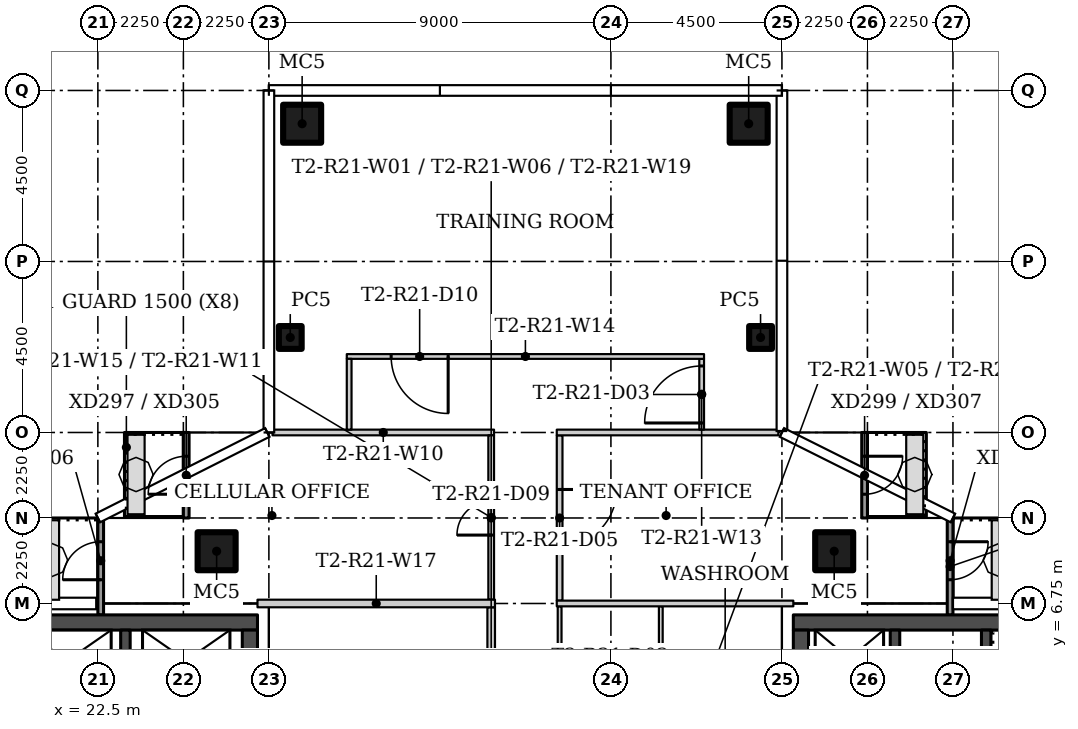
"""IFC4 building model, lengths in metres.
Left out: names, types, materials, properties, quantities, classifications, styles, units other than length and angle.
Written with IfcOpenShell. Run it as: python <this file> out.ifc"""

import sys

from ifc_helpers import new_model, si_unit, direction, frame, frame_2d, origin, origin_2d, place, context, subcontext, project, spatial, rectangle, hollow_rectangle, extrude, element, fill, save


model = new_model("IFC4")
c1 = context("Model", 3, precision=1e-05, world=origin(), true_north=direction((0.0, 1.0)))
c2 = subcontext(c1, "Body", "Model", "MODEL_VIEW")
j1 = project(units=[si_unit("LENGTHUNIT", "METRE"), si_unit("PLANEANGLEUNIT", "RADIAN")], contexts=[c1])
p1 = place(None, origin())
s1 = spatial("IfcSite", under=j1, at=p1, CompositionType="ELEMENT")
p2 = place(p1, origin())
s2 = spatial("IfcBuilding", under=s1, at=p2, CompositionType="ELEMENT")
p3 = place(p2, frame((0.0, 0.0, 194.4)))
s3 = spatial("IfcBuildingStorey", under=s2, at=p3, CompositionType="ELEMENT", Elevation=194.4)
for number, where in (
    (1, (25.625, 8.125, 0.0)),
    (2, (41.875, 8.125, 0.0)),
):
    element("IfcColumn", number, at=place(p3, frame(where)), inside=s3, PredefinedType="COLUMN", context=c2, shape_type="SweptSolid", body=[
        extrude(hollow_rectangle(XDim=1.0, YDim=1.0, WallThickness=0.04, at=origin_2d()), origin(), (0.0, 0.0, 1.0), 3.55),
    ])
p4 = place(p3, frame((39.938, 13.75, 0.0)))
e3 = element("IfcColumn", 3, at=p4, inside=s3, PredefinedType="COLUMN", context=c2, shape_type="SweptSolid", body=[
    extrude(hollow_rectangle(XDim=0.6, YDim=0.6, WallThickness=0.02, at=origin_2d()), origin(), (0.0, 0.0, 1.0), 3.55),
])
p5 = place(p3, frame((39.625, 19.375, 0.0)))
e4 = element("IfcColumn", 4, at=p5, inside=s3, PredefinedType="COLUMN", context=c2, shape_type="SweptSolid", body=[
    extrude(hollow_rectangle(XDim=1.0, YDim=1.0, WallThickness=0.04, at=origin_2d()), origin(), (0.0, 0.0, 1.0), 3.55),
])
p6 = place(p3, frame((27.562, 13.75, 0.0)))
e5 = element("IfcColumn", 5, at=p6, inside=s3, PredefinedType="COLUMN", context=c2, shape_type="SweptSolid", body=[
    extrude(hollow_rectangle(XDim=0.6, YDim=0.6, WallThickness=0.02, at=origin_2d()), origin(), (0.0, 0.0, 1.0), 3.55),
])
p7 = place(p3, frame((27.875, 19.375, 0.0)))
e6 = element("IfcColumn", 6, at=p7, inside=s3, PredefinedType="COLUMN", context=c2, shape_type="SweptSolid", body=[
    extrude(hollow_rectangle(XDim=1.0, YDim=1.0, WallThickness=0.04, at=origin_2d()), origin(), (0.0, 0.0, 1.0), 3.55),
])
p8 = place(p3, frame((32.85, 2.55, 0.0), z_axis=(0.0, 0.0, 1.0), x_axis=(0.0, 1.0, 0.0)))
e7 = element("IfcWall", 7, at=p8, inside=s3, PredefinedType="PARTITIONING", context=c2, shape_type="SweptSolid", body=[
    extrude(rectangle(XDim=4.1, YDim=0.2, at=frame_2d((2.05, 0.0))), origin(), (0.0, 0.0, 1.0), 3.55),
])
p9 = place(p3, frame((34.65, 6.675, 0.0), z_axis=(0.0, 0.0, 1.0), x_axis=(0.0, -1.0, 0.0)))
e8 = element("IfcWall", 8, at=p9, inside=s3, PredefinedType="PARTITIONING", context=c2, shape_type="SweptSolid", body=[
    extrude(rectangle(XDim=4.175, YDim=0.1, at=frame_2d((2.087, 0.0))), origin(), (0.0, 0.0, 1.0), 3.55),
])
p10 = place(p3, frame((34.65, 11.175, 0.0), z_axis=(0.0, 0.0, 1.0), x_axis=(0.0, -1.0, 0.0)))
e9 = element("IfcWall", 9, at=p10, inside=s3, PredefinedType="PARTITIONING", context=c2, shape_type="SweptSolid", body=[
    extrude(rectangle(XDim=4.35, YDim=0.15, at=frame_2d((2.175, 0.0))), origin(), (0.0, 0.0, 1.0), 3.55),
])
p11 = place(p10, frame((1.425, 0.0, 0.0)))
e10 = element("IfcOpeningElement", 10, at=p11, cuts=e9, PredefinedType="OPENING", context=c2, shape_type="SweptSolid", body=[
    extrude(rectangle(XDim=1.5, YDim=2.1, at=frame_2d((0.75, 1.05))), frame((0.0, 0.085, 0.0), z_axis=(0.0, -1.0, 0.0), x_axis=(1.0, 0.0, 0.0)), (0.0, 0.0, 1.0), 0.17),
])
for number, where, z_axis, x_axis in (
    (11, (32.925, 11.25, 0.0), (0.0, 0.0, 1.0), (-1.0, 0.0, 0.0)),
    (12, (40.405, 11.25, 0.0), (0.0, 0.0, 1.0), (-1.0, 0.0, 0.0)),
):
    element("IfcWall", number, at=place(p3, frame(where, z_axis=z_axis, x_axis=x_axis)), inside=s3, PredefinedType="PARTITIONING", context=c2, shape_type="SweptSolid", body=[
        extrude(rectangle(XDim=5.83, YDim=0.15, at=frame_2d((2.915, 0.0))), origin(), (0.0, 0.0, 1.0), 3.55),
    ])
p12 = place(p3, frame((32.85, 6.85, 0.0), z_axis=(0.0, 0.0, 1.0), x_axis=(0.0, 1.0, 0.0)))
e13 = element("IfcWall", 13, at=p12, inside=s3, PredefinedType="PARTITIONING", context=c2, shape_type="SweptSolid", body=[
    extrude(rectangle(XDim=4.325, YDim=0.15, at=frame_2d((2.163, 0.0))), origin(), (0.0, 0.0, 1.0), 3.55),
])
p13 = place(p12, frame((1.7, 0.0, 0.0)))
e14 = element("IfcOpeningElement", 14, at=p13, cuts=e13, PredefinedType="OPENING", context=c2, shape_type="SweptSolid", body=[
    extrude(rectangle(XDim=0.9, YDim=2.1, at=frame_2d((0.45, 1.05))), frame((0.0, 0.085, 0.0), z_axis=(0.0, -1.0, 0.0), x_axis=(1.0, 0.0, 0.0)), (0.0, 0.0, 1.0), 0.17),
])
p14 = place(p3, frame((38.388, 11.325, 0.0), z_axis=(0.0, 0.0, 1.0), x_axis=(0.0, 1.0, 0.0)))
e15 = element("IfcWall", 15, at=p14, inside=s3, PredefinedType="PARTITIONING", context=c2, shape_type="SweptSolid", body=[
    extrude(rectangle(XDim=1.863, YDim=0.125, at=frame_2d((0.931, 0.0))), origin(), (0.0, 0.0, 1.0), 3.55),
])
p15 = place(p14, frame((0.175, 0.0, 0.0)))
e16 = element("IfcOpeningElement", 16, at=p15, cuts=e15, PredefinedType="OPENING", context=c2, shape_type="SweptSolid", body=[
    extrude(rectangle(XDim=1.5, YDim=2.1, at=frame_2d((0.75, 1.05))), frame((0.0, 0.073, 0.0), z_axis=(0.0, -1.0, 0.0), x_axis=(1.0, 0.0, 0.0)), (0.0, 0.0, 1.0), 0.145),
])
p16 = place(p3, frame((38.45, 13.25, 0.0), z_axis=(0.0, 0.0, 1.0), x_axis=(-1.0, 0.0, 0.0)))
e17 = element("IfcWall", 17, at=p16, inside=s3, PredefinedType="PARTITIONING", context=c2, shape_type="SweptSolid", body=[
    extrude(rectangle(XDim=9.4, YDim=0.125, at=frame_2d((4.7, 0.0))), origin(), (0.0, 0.0, 1.0), 3.55),
])
p17 = place(p16, frame((6.733, 0.0, 0.0)))
e18 = element("IfcOpeningElement", 18, at=p17, cuts=e17, PredefinedType="OPENING", context=c2, shape_type="SweptSolid", body=[
    extrude(rectangle(XDim=1.5, YDim=2.1, at=frame_2d((0.75, 1.05))), frame((0.0, 0.073, 0.0), z_axis=(0.0, -1.0, 0.0), x_axis=(1.0, 0.0, 0.0)), (0.0, 0.0, 1.0), 0.145),
])
p18 = place(p3, frame((29.112, 13.188, 0.0), z_axis=(0.0, 0.0, 1.0), x_axis=(0.0, -1.0, 0.0)))
e19 = element("IfcWall", 19, at=p18, inside=s3, PredefinedType="PARTITIONING", context=c2, shape_type="SweptSolid", body=[
    extrude(rectangle(XDim=1.863, YDim=0.125, at=frame_2d((0.931, 0.0))), origin(), (0.0, 0.0, 1.0), 3.55),
])
p19 = place(p3, frame((32.95, 6.75, 0.0), z_axis=(0.0, 0.0, 1.0), x_axis=(-1.0, 0.0, 0.0)))
e20 = element("IfcWall", 20, at=p19, inside=s3, PredefinedType="PARTITIONING", context=c2, shape_type="SweptSolid", body=[
    extrude(rectangle(XDim=6.25, YDim=0.2, at=frame_2d((3.125, 0.0))), origin(), (0.0, 0.0, 1.0), 3.55),
])
p20 = place(p3, frame((37.312, 6.675, 0.0), z_axis=(0.0, 0.0, 1.0), x_axis=(0.0, -1.0, 0.0)))
e21 = element("IfcWall", 21, at=p20, inside=s3, PredefinedType="PARTITIONING", context=c2, shape_type="SweptSolid", body=[
    extrude(rectangle(XDim=4.175, YDim=0.1, at=frame_2d((2.087, 0.0))), origin(), (0.0, 0.0, 1.0), 3.55),
])
p21 = place(p3, frame((40.8, 6.75, 0.0), z_axis=(0.0, 0.0, 1.0), x_axis=(-1.0, 0.0, 0.0)))
e22 = element("IfcWall", 22, at=p21, inside=s3, PredefinedType="PARTITIONING", context=c2, shape_type="SweptSolid", body=[
    extrude(rectangle(XDim=6.225, YDim=0.15, at=frame_2d((3.112, 0.0))), origin(), (0.0, 0.0, 1.0), 3.55),
])
p22 = place(p3, frame((24.825, 9.0, 0.0), z_axis=(0.0, 0.0, 1.0), x_axis=(0.0, 1.0, 0.0)))
e23 = element("IfcWall", 23, at=p22, inside=s3, PredefinedType="SOLIDWALL", context=c2, shape_type="SweptSolid", body=[
    extrude(rectangle(XDim=2.25, YDim=0.15, at=frame_2d((1.125, 0.0))), origin(), (0.0, 0.0, 1.0), 3.45),
])
p23 = place(p22, frame((0.625, 0.0, 0.0)))
e24 = element("IfcOpeningElement", 24, at=p23, cuts=e23, PredefinedType="OPENING", context=c2, shape_type="SweptSolid", body=[
    extrude(rectangle(XDim=1.0, YDim=2.4, at=frame_2d((0.5, 1.2))), frame((0.0, 0.085, 0.0), z_axis=(0.0, -1.0, 0.0), x_axis=(1.0, 0.0, 0.0)), (0.0, 0.0, 1.0), 0.17),
])
p24 = place(p3, frame((22.575, 6.448, 0.0), z_axis=(0.0, 0.0, 1.0), x_axis=(0.0, 1.0, 0.0)))
e25 = element("IfcWall", 25, at=p24, inside=s3, PredefinedType="SOLIDWALL", context=c2, shape_type="SweptSolid", body=[
    extrude(rectangle(XDim=2.552, YDim=0.15, at=frame_2d((1.276, 0.0))), origin(), (0.0, 0.0, 1.0), 3.45),
])
p25 = place(p24, frame((0.927, 0.0, 0.0)))
e26 = element("IfcOpeningElement", 26, at=p25, cuts=e25, PredefinedType="OPENING", context=c2, shape_type="SweptSolid", body=[
    extrude(rectangle(XDim=1.0, YDim=2.4, at=frame_2d((0.5, 1.2))), frame((0.0, 0.085, 0.0), z_axis=(0.0, -1.0, 0.0), x_axis=(1.0, 0.0, 0.0)), (0.0, 0.0, 1.0), 0.17),
])
p26 = place(p3, frame((42.675, 11.25, 0.0), z_axis=(0.0, 0.0, 1.0), x_axis=(0.0, -1.0, 0.0)))
e27 = element("IfcWall", 27, at=p26, inside=s3, PredefinedType="SOLIDWALL", context=c2, shape_type="SweptSolid", body=[
    extrude(rectangle(XDim=2.25, YDim=0.15, at=frame_2d((1.125, 0.0))), origin(), (0.0, 0.0, 1.0), 3.45),
])
p27 = place(p26, frame((0.625, 0.0, 0.0)))
e28 = element("IfcOpeningElement", 28, at=p27, cuts=e27, PredefinedType="OPENING", context=c2, shape_type="SweptSolid", body=[
    extrude(rectangle(XDim=1.0, YDim=2.4, at=frame_2d((0.5, 1.2))), frame((0.0, 0.085, 0.0), z_axis=(0.0, -1.0, 0.0), x_axis=(1.0, 0.0, 0.0)), (0.0, 0.0, 1.0), 0.17),
])
p28 = place(p3, frame((44.925, 9.0, 0.0), z_axis=(0.0, 0.0, 1.0), x_axis=(0.0, -1.0, 0.0)))
e29 = element("IfcWall", 29, at=p28, inside=s3, PredefinedType="SOLIDWALL", context=c2, shape_type="SweptSolid", body=[
    extrude(rectangle(XDim=2.557, YDim=0.15, at=frame_2d((1.278, 0.0))), origin(), (0.0, 0.0, 1.0), 3.45),
])
p29 = place(p28, frame((0.625, 0.0, 0.0)))
e30 = element("IfcOpeningElement", 30, at=p29, cuts=e29, PredefinedType="OPENING", context=c2, shape_type="SweptSolid", body=[
    extrude(rectangle(XDim=1.0, YDim=2.4, at=frame_2d((0.5, 1.2))), frame((0.0, 0.085, 0.0), z_axis=(0.0, -1.0, 0.0), x_axis=(1.0, 0.0, 0.0)), (0.0, 0.0, 1.0), 0.17),
])
p30 = place(p3, frame((13.8, 6.25, 0.0)))
e31 = element("IfcWall", 31, at=p30, inside=s3, PredefinedType="SHEAR", context=c2, shape_type="SweptSolid", body=[
    extrude(rectangle(XDim=12.9, YDim=0.4, at=frame_2d((6.45, 0.0))), origin(), (0.0, 0.0, 1.0), 3.55),
])
p31 = place(p3, frame((26.5, 6.05, 0.0), z_axis=(0.0, 0.0, 1.0), x_axis=(0.0, -1.0, 0.0)))
e32 = element("IfcWall", 32, at=p31, inside=s3, PredefinedType="SHEAR", context=c2, shape_type="SweptSolid", body=[
    extrude(rectangle(XDim=12.1, YDim=0.4, at=frame_2d((6.05, 0.0))), origin(), (0.0, 0.0, 1.0), 3.55),
])
p32 = place(p31, frame((10.1, 0.0, 0.0)))
e33 = element("IfcOpeningElement", 33, at=p32, cuts=e32, PredefinedType="OPENING", context=c2, shape_type="SweptSolid", body=[
    extrude(rectangle(XDim=1.2, YDim=2.1, at=frame_2d((0.6, 1.05))), frame((0.0, 0.21, 0.0), z_axis=(0.0, -1.0, 0.0), x_axis=(1.0, 0.0, 0.0)), (0.0, 0.0, 1.0), 0.42),
])
p33 = place(p31, frame((3.9, 0.0, 0.0)))
e34 = element("IfcOpeningElement", 34, at=p33, cuts=e32, PredefinedType="OPENING", context=c2, shape_type="SweptSolid", body=[
    extrude(rectangle(XDim=1.8, YDim=2.4, at=frame_2d((0.9, 1.2))), frame((0.0, 0.21, 0.0), z_axis=(0.0, -1.0, 0.0), x_axis=(1.0, 0.0, 0.0)), (0.0, 0.0, 1.0), 0.42),
])
p34 = place(p3, frame((23.225, 3.25, 0.0), z_axis=(0.0, 0.0, 1.0), x_axis=(0.0, 1.0, 0.0)))
e35 = element("IfcWall", 35, at=p34, inside=s3, PredefinedType="SHEAR", context=c2, shape_type="SweptSolid", body=[
    extrude(rectangle(XDim=2.8, YDim=0.25, at=frame_2d((1.4, 0.0))), origin(), (0.0, 0.0, 1.0), 3.55),
])
p35 = place(p3, frame((53.7, 6.25, 0.0), z_axis=(0.0, 0.0, 1.0), x_axis=(-1.0, 0.0, 0.0)))
e36 = element("IfcWall", 36, at=p35, inside=s3, PredefinedType="SHEAR", context=c2, shape_type="SweptSolid", body=[
    extrude(rectangle(XDim=12.9, YDim=0.4, at=frame_2d((6.45, 0.0))), origin(), (0.0, 0.0, 1.0), 3.55),
])
p36 = place(p3, frame((41.0, -6.05, 0.0), z_axis=(0.0, 0.0, 1.0), x_axis=(0.0, 1.0, 0.0)))
e37 = element("IfcWall", 37, at=p36, inside=s3, PredefinedType="SHEAR", context=c2, shape_type="SweptSolid", body=[
    extrude(rectangle(XDim=12.1, YDim=0.4, at=frame_2d((6.05, 0.0))), origin(), (0.0, 0.0, 1.0), 3.55),
])
p37 = place(p36, frame((0.8, 0.0, 0.0)))
e38 = element("IfcOpeningElement", 38, at=p37, cuts=e37, PredefinedType="OPENING", context=c2, shape_type="SweptSolid", body=[
    extrude(rectangle(XDim=1.2, YDim=2.1, at=frame_2d((0.6, 1.05))), frame((0.0, 0.21, 0.0), z_axis=(0.0, -1.0, 0.0), x_axis=(1.0, 0.0, 0.0)), (0.0, 0.0, 1.0), 0.42),
])
p38 = place(p36, frame((6.4, 0.0, 0.0)))
e39 = element("IfcOpeningElement", 39, at=p38, cuts=e37, PredefinedType="OPENING", context=c2, shape_type="SweptSolid", body=[
    extrude(rectangle(XDim=1.8, YDim=2.4, at=frame_2d((0.9, 1.2))), frame((0.0, 0.21, 0.0), z_axis=(0.0, -1.0, 0.0), x_axis=(1.0, 0.0, 0.0)), (0.0, 0.0, 1.0), 0.42),
])
for number, where, z_axis, x_axis in (
    (40, (45.875, 3.25, 0.0), (0.0, 0.0, 1.0), (0.0, 1.0, 0.0)),
    (41, (43.475, 3.25, 0.0), (0.0, 0.0, 1.0), (0.0, 1.0, 0.0)),
):
    element("IfcWall", number, at=place(p3, frame(where, z_axis=z_axis, x_axis=x_axis)), inside=s3, PredefinedType="SHEAR", context=c2, shape_type="SweptSolid", body=[
        extrude(rectangle(XDim=2.8, YDim=0.25, at=frame_2d((1.4, 0.0))), origin(), (0.0, 0.0, 1.0), 3.55),
    ])
p39 = place(p15, origin())
e42 = element("IfcDoor", 42, at=p39, inside=s3, OperationType="DOUBLE_DOOR_SINGLE_SWING", PredefinedType="DOOR", context=c2, shape_type="SweptSolid", body=[
    extrude(rectangle(XDim=1.5, YDim=2.1, at=frame_2d((0.75, 1.05))), frame((0.0, 0.025, 0.0), z_axis=(0.0, -1.0, 0.0), x_axis=(1.0, 0.0, 0.0)), (0.0, 0.0, 1.0), 0.05),
])
fill(e16, e42)
p40 = place(p11, origin())
e43 = element("IfcDoor", 43, at=p40, inside=s3, OperationType="DOUBLE_DOOR_SINGLE_SWING", PredefinedType="DOOR", context=c2, shape_type="SweptSolid", body=[
    extrude(rectangle(XDim=1.5, YDim=2.1, at=frame_2d((0.75, 1.05))), frame((0.0, 0.025, 0.0), z_axis=(0.0, -1.0, 0.0), x_axis=(1.0, 0.0, 0.0)), (0.0, 0.0, 1.0), 0.05),
])
fill(e10, e43)
p41 = place(p13, origin())
e44 = element("IfcDoor", 44, at=p41, inside=s3, OperationType="SINGLE_SWING_RIGHT", PredefinedType="DOOR", context=c2, shape_type="SweptSolid", body=[
    extrude(rectangle(XDim=0.9, YDim=2.1, at=frame_2d((0.45, 1.05))), frame((0.0, 0.025, 0.0), z_axis=(0.0, -1.0, 0.0), x_axis=(1.0, 0.0, 0.0)), (0.0, 0.0, 1.0), 0.05),
])
fill(e14, e44)
p42 = place(p17, origin())
e45 = element("IfcDoor", 45, at=p42, inside=s3, OperationType="DOUBLE_DOOR_SINGLE_SWING", PredefinedType="DOOR", context=c2, shape_type="SweptSolid", body=[
    extrude(rectangle(XDim=1.5, YDim=2.1, at=frame_2d((0.75, 1.05))), frame((0.0, 0.025, 0.0), z_axis=(0.0, -1.0, 0.0), x_axis=(1.0, 0.0, 0.0)), (0.0, 0.0, 1.0), 0.05),
])
fill(e18, e45)
p43 = place(p23, origin())
e46 = element("IfcDoor", 46, at=p43, inside=s3, OperationType="SINGLE_SWING_RIGHT", PredefinedType="DOOR", context=c2, shape_type="SweptSolid", body=[
    extrude(rectangle(XDim=1.0, YDim=2.4, at=frame_2d((0.5, 1.2))), frame((0.0, 0.025, 0.0), z_axis=(0.0, -1.0, 0.0), x_axis=(1.0, 0.0, 0.0)), (0.0, 0.0, 1.0), 0.05),
])
fill(e24, e46)
p44 = place(p25, origin())
e47 = element("IfcDoor", 47, at=p44, inside=s3, OperationType="SINGLE_SWING_LEFT", PredefinedType="DOOR", context=c2, shape_type="SweptSolid", body=[
    extrude(rectangle(XDim=1.0, YDim=2.4, at=frame_2d((0.5, 1.2))), frame((0.0, 0.025, 0.0), z_axis=(0.0, -1.0, 0.0), x_axis=(1.0, 0.0, 0.0)), (0.0, 0.0, 1.0), 0.05),
])
fill(e26, e47)
p45 = place(p27, origin())
e48 = element("IfcDoor", 48, at=p45, inside=s3, OperationType="SINGLE_SWING_RIGHT", PredefinedType="DOOR", context=c2, shape_type="SweptSolid", body=[
    extrude(rectangle(XDim=1.0, YDim=2.4, at=frame_2d((0.5, 1.2))), frame((0.0, 0.025, 0.0), z_axis=(0.0, -1.0, 0.0), x_axis=(1.0, 0.0, 0.0)), (0.0, 0.0, 1.0), 0.05),
])
fill(e28, e48)
p46 = place(p29, origin())
e49 = element("IfcDoor", 49, at=p46, inside=s3, OperationType="SINGLE_SWING_LEFT", PredefinedType="DOOR", context=c2, shape_type="SweptSolid", body=[
    extrude(rectangle(XDim=1.0, YDim=2.4, at=frame_2d((0.5, 1.2))), frame((0.0, 0.025, 0.0), z_axis=(0.0, -1.0, 0.0), x_axis=(1.0, 0.0, 0.0)), (0.0, 0.0, 1.0), 0.05),
])
fill(e30, e49)
save(model, sys.argv[1])
